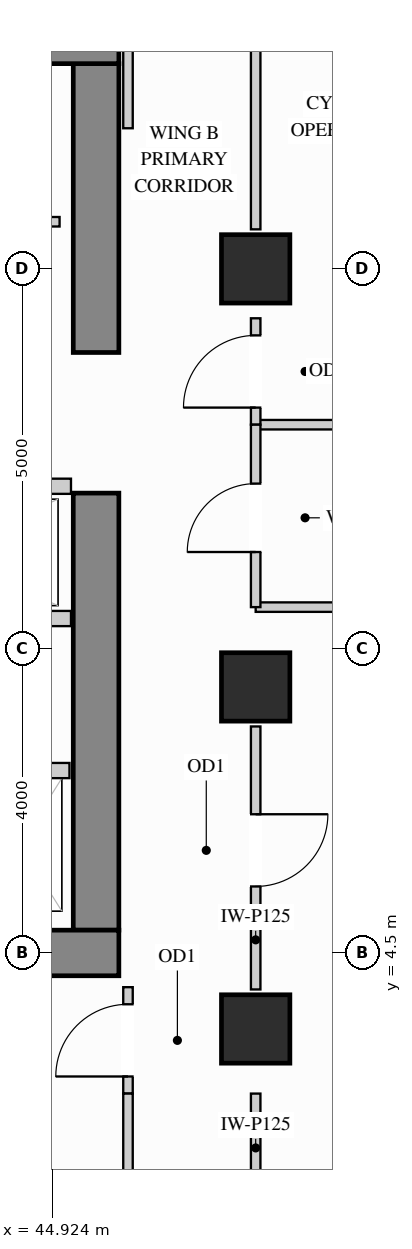
"""IFC4 building model, lengths in metres.
Left out: names, types, materials, properties, quantities, classifications, styles, units other than length and angle.
Written with IfcOpenShell. Run it as: python <this file> out.ifc"""

import sys

from ifc_helpers import new_model, si_unit, direction, frame, frame_2d, origin, origin_2d, place, context, subcontext, project, spatial, rectangle, extrude, source, transform, mapped, element, fill, save


model = new_model("IFC4")
c1 = context("Model", 3, precision=1e-05, world=origin(), true_north=direction((0.0, 1.0)))
c2 = subcontext(c1, "Body", "Model", "MODEL_VIEW")
j1 = project(units=[si_unit("LENGTHUNIT", "METRE"), si_unit("PLANEANGLEUNIT", "RADIAN")], contexts=[c1])
p1 = place(None, origin())
s1 = spatial("IfcSite", under=j1, at=p1, CompositionType="ELEMENT")
p2 = place(p1, origin())
s2 = spatial("IfcBuilding", under=s1, at=p2, CompositionType="ELEMENT")
p3 = place(p2, frame((0.0, 0.0, 193.5)))
s3 = spatial("IfcBuildingStorey", under=s2, at=p3, CompositionType="ELEMENT", Elevation=193.5)
m1 = source(origin(), c2, "Body", "SweptSolid", [
    extrude(rectangle(XDim=0.9, YDim=0.9, at=origin_2d()), origin(), (0.0, 0.0, 1.0), 3.4),
])
for number, where, z_axis, x_axis in (
    (1, (47.6, 13.5, 0.0), (0.0, 0.0, 1.0), (1.0, 0.0, 0.0)),
    (2, (47.6, 3.5, 0.0), (0.0, 0.0, 1.0), (1.0, 0.0, 0.0)),
    (3, (47.6, 8.0, 0.0), (0.0, 0.0, 1.0), (1.0, 0.0, 0.0)),
):
    element("IfcColumn", number, at=place(p3, frame(where, z_axis=z_axis, x_axis=x_axis)), inside=s3, PredefinedType="COLUMN", context=c2, shape_type="MappedRepresentation", body=[
        mapped(m1, transform((0.0, 0.0, 0.0), x_axis=(1.0, 0.0, 0.0), y_axis=(0.0, 1.0, 0.0), z_axis=(0.0, 0.0, 1.0))),
    ])
m2 = source(origin(), c2, "Body", "SweptSolid", [
    extrude(rectangle(XDim=5.75, YDim=0.6, at=frame_2d((2.875, 0.0))), origin(), (0.0, 0.0, 1.0), 3.4),
])
p4 = place(p3, frame((45.5, 4.8, 0.0), z_axis=(0.0, 0.0, 1.0), x_axis=(0.0, 1.0, 0.0)))
e4 = element("IfcWall", 4, at=p4, inside=s3, PredefinedType="SHEAR", context=c2, shape_type="MappedRepresentation", body=[
    mapped(m2, transform((0.0, 0.0, 0.0), x_axis=(1.0, 0.0, 0.0), y_axis=(0.0, 1.0, 0.0), z_axis=(0.0, 0.0, 1.0))),
])
m3 = source(origin(), c2, "Body", "SweptSolid", [
    extrude(rectangle(XDim=3.8, YDim=0.6, at=frame_2d((1.9, 0.0))), origin(), (0.0, 0.0, 1.0), 3.4),
])
p5 = place(p3, frame((45.5, 12.4, 0.0), z_axis=(0.0, 0.0, 1.0), x_axis=(0.0, 1.0, 0.0)))
e5 = element("IfcWall", 5, at=p5, inside=s3, PredefinedType="SHEAR", context=c2, shape_type="MappedRepresentation", body=[
    mapped(m3, transform((0.0, 0.0, 0.0), x_axis=(1.0, 0.0, 0.0), y_axis=(0.0, 1.0, 0.0), z_axis=(0.0, 0.0, 1.0))),
])
m4 = source(origin(), c2, "Body", "SweptSolid", [
    extrude(rectangle(XDim=10.1, YDim=0.6, at=frame_2d((5.05, 0.0))), origin(), (0.0, 0.0, 1.0), 3.4),
])
for number, where, z_axis, x_axis in (
    (6, (35.7, 16.5, 0.0), (0.0, 0.0, 1.0), (1.0, 0.0, 0.0)),
    (7, (35.7, 4.5, 0.0), (0.0, 0.0, 1.0), (1.0, 0.0, 0.0)),
):
    element("IfcWall", number, at=place(p3, frame(where, z_axis=z_axis, x_axis=x_axis)), inside=s3, PredefinedType="SHEAR", context=c2, shape_type="MappedRepresentation", body=[
        mapped(m4, transform((0.0, 0.0, 0.0), x_axis=(1.0, 0.0, 0.0), y_axis=(0.0, 1.0, 0.0), z_axis=(0.0, 0.0, 1.0))),
    ])
p6 = place(p3, frame((40.75, 14.12, 0.0), z_axis=(0.0, 0.0, 1.0), x_axis=(1.0, 0.0, 0.0)))
e8 = element("IfcWall", 8, at=p6, inside=s3, PredefinedType="PARTITIONING", context=c2, shape_type="SweptSolid", body=[
    extrude(rectangle(XDim=4.27, YDim=0.125, at=frame_2d((2.135, 0.0))), origin(), (0.0, 0.0, 1.0), 3.385),
])
p7 = place(p6, frame((1.66, 0.0, 0.0)))
e9 = element("IfcOpeningElement", 9, at=p7, cuts=e8, PredefinedType="OPENING", context=c2, shape_type="SweptSolid", body=[
    extrude(rectangle(XDim=0.95, YDim=2.15, at=frame_2d((0.475, 1.075))), frame((0.0, 0.073, 0.0), z_axis=(0.0, -1.0, 0.0), x_axis=(1.0, 0.0, 0.0)), (0.0, 0.0, 1.0), 0.145),
])
m5 = source(origin(), c2, "Body", "SweptSolid", [
    extrude(rectangle(XDim=5.048, YDim=0.125, at=frame_2d((2.524, 0.0))), origin(), (0.0, 0.0, 1.0), 3.385),
])
for number, where, z_axis, x_axis in (
    (10, (47.6, 11.45, 0.0), (0.0, 0.0, 1.0), (1.0, 0.0, 0.0)),
    (11, (47.6, 9.05, 0.0), (0.0, 0.0, 1.0), (1.0, 0.0, 0.0)),
):
    element("IfcWall", number, at=place(p3, frame(where, z_axis=z_axis, x_axis=x_axis)), inside=s3, PredefinedType="PARTITIONING", context=c2, shape_type="MappedRepresentation", body=[
        mapped(m5, transform((0.0, 0.0, 0.0), x_axis=(1.0, 0.0, 0.0), y_axis=(0.0, 1.0, 0.0), z_axis=(0.0, 0.0, 1.0))),
    ])
p8 = place(p3, frame((47.6, 4.02, 0.0), z_axis=(0.0, 0.0, 1.0), x_axis=(0.0, 1.0, 0.0)))
e12 = element("IfcWall", 12, at=p8, inside=s3, PredefinedType="PARTITIONING", context=c2, shape_type="SweptSolid", body=[
    extrude(rectangle(XDim=3.46, YDim=0.125, at=frame_2d((1.73, 0.0))), origin(), (0.0, 0.0, 1.0), 2.773),
])
p9 = place(p8, frame((1.355, 0.0, 0.0)))
e13 = element("IfcOpeningElement", 13, at=p9, cuts=e12, PredefinedType="OPENING", context=c2, shape_type="SweptSolid", body=[
    extrude(rectangle(XDim=0.95, YDim=2.15, at=frame_2d((0.475, 1.075))), frame((0.0, 0.073, 0.0), z_axis=(0.0, -1.0, 0.0), x_axis=(1.0, 0.0, 0.0)), (0.0, 0.0, 1.0), 0.145),
])
m6 = source(origin(), c2, "Body", "SweptSolid", [
    extrude(rectangle(XDim=1.53, YDim=0.125, at=frame_2d((0.765, 0.0))), origin(), (0.0, 0.0, 1.0), 2.773),
])
p10 = place(p3, frame((47.6, 1.12, 0.0), z_axis=(0.0, 0.0, 1.0), x_axis=(0.0, 1.0, 0.0)))
e14 = element("IfcWall", 14, at=p10, inside=s3, PredefinedType="PARTITIONING", context=c2, shape_type="MappedRepresentation", body=[
    mapped(m6, transform((0.0, 0.0, 0.0), x_axis=(1.0, 0.0, 0.0), y_axis=(0.0, 1.0, 0.0), z_axis=(0.0, 0.0, 1.0))),
])
p11 = place(p3, frame((47.6, 11.45, 0.0), z_axis=(0.0, 0.0, 1.0), x_axis=(0.0, 1.0, 0.0)))
e15 = element("IfcWall", 15, at=p11, inside=s3, PredefinedType="PARTITIONING", context=c2, shape_type="SweptSolid", body=[
    extrude(rectangle(XDim=1.4, YDim=0.125, at=frame_2d((0.7, 0.0))), origin(), (0.0, 0.0, 1.0), 2.773),
])
p12 = place(p11, frame((0.225, 0.0, 0.0)))
e16 = element("IfcOpeningElement", 16, at=p12, cuts=e15, PredefinedType="OPENING", context=c2, shape_type="SweptSolid", body=[
    extrude(rectangle(XDim=0.95, YDim=2.15, at=frame_2d((0.475, 1.075))), frame((0.0, 0.073, 0.0), z_axis=(0.0, -1.0, 0.0), x_axis=(1.0, 0.0, 0.0)), (0.0, 0.0, 1.0), 0.145),
])
m7 = source(origin(), c2, "Body", "SweptSolid", [
    extrude(rectangle(XDim=2.86, YDim=0.125, at=frame_2d((1.43, 0.0))), origin(), (0.0, 0.0, 1.0), 2.773),
])
p13 = place(p3, frame((47.6, 14.02, 0.0), z_axis=(0.0, 0.0, 1.0), x_axis=(0.0, 1.0, 0.0)))
e17 = element("IfcWall", 17, at=p13, inside=s3, PredefinedType="PARTITIONING", context=c2, shape_type="MappedRepresentation", body=[
    mapped(m7, transform((0.0, 0.0, 0.0), x_axis=(1.0, 0.0, 0.0), y_axis=(0.0, 1.0, 0.0), z_axis=(0.0, 0.0, 1.0))),
])
p14 = place(p3, frame((47.6, 9.05, 0.0), z_axis=(0.0, 0.0, 1.0), x_axis=(0.0, 1.0, 0.0)))
e18 = element("IfcWall", 18, at=p14, inside=s3, PredefinedType="PARTITIONING", context=c2, shape_type="SweptSolid", body=[
    extrude(rectangle(XDim=2.4, YDim=0.125, at=frame_2d((1.2, 0.0))), origin(), (0.0, 0.0, 1.0), 2.773),
])
p15 = place(p14, frame((0.725, 0.0, 0.0)))
e19 = element("IfcOpeningElement", 19, at=p15, cuts=e18, PredefinedType="OPENING", context=c2, shape_type="SweptSolid", body=[
    extrude(rectangle(XDim=0.9, YDim=2.15, at=frame_2d((0.45, 1.075))), frame((0.0, 0.073, 0.0), z_axis=(0.0, -1.0, 0.0), x_axis=(1.0, 0.0, 0.0)), (0.0, 0.0, 1.0), 0.145),
])
m8 = source(origin(), c2, "Body", "SweptSolid", [
    extrude(rectangle(XDim=2.298, YDim=0.125, at=frame_2d((1.149, 0.0))), origin(), (0.0, 0.0, 1.0), 3.385),
])
p16 = place(p3, frame((45.92, 15.35, 0.0), z_axis=(0.0, 0.0, 1.0), x_axis=(0.0, 1.0, 0.0)))
e20 = element("IfcWall", 20, at=p16, inside=s3, PredefinedType="PARTITIONING", context=c2, shape_type="MappedRepresentation", body=[
    mapped(m8, transform((0.0, 0.0, 0.0), x_axis=(1.0, 0.0, 0.0), y_axis=(0.0, 1.0, 0.0), z_axis=(0.0, 0.0, 1.0))),
])
p17 = place(p3, frame((45.92, 2.65, 0.0), z_axis=(0.0, 0.0, 1.0), x_axis=(0.0, 1.0, 0.0)))
e21 = element("IfcWall", 21, at=p17, inside=s3, PredefinedType="PARTITIONING", context=c2, shape_type="SweptSolid", body=[
    extrude(rectangle(XDim=1.4, YDim=0.125, at=frame_2d((0.7, 0.0))), origin(), (0.0, 0.0, 1.0), 3.385),
])
p18 = place(p17, frame((0.225, 0.0, 0.0)))
e22 = element("IfcOpeningElement", 22, at=p18, cuts=e21, PredefinedType="OPENING", context=c2, shape_type="SweptSolid", body=[
    extrude(rectangle(XDim=0.95, YDim=2.15, at=frame_2d((0.475, 1.075))), frame((0.0, 0.073, 0.0), z_axis=(0.0, -1.0, 0.0), x_axis=(1.0, 0.0, 0.0)), (0.0, 0.0, 1.0), 0.145),
])
p19 = place(p3, frame((45.92, 0.352, 0.0), z_axis=(0.0, 0.0, 1.0), x_axis=(0.0, 1.0, 0.0)))
e23 = element("IfcWall", 23, at=p19, inside=s3, PredefinedType="PARTITIONING", context=c2, shape_type="MappedRepresentation", body=[
    mapped(m8, transform((0.0, 0.0, 0.0), x_axis=(1.0, 0.0, 0.0), y_axis=(0.0, 1.0, 0.0), z_axis=(0.0, 0.0, 1.0))),
])
m9 = source(origin(), c2, "Body", "SweptSolid", [
    extrude(rectangle(XDim=1.3, YDim=0.2, at=frame_2d((0.65, 0.0))), origin(), (0.0, 0.0, 1.0), 3.385),
])
p20 = place(p3, frame((43.85, 6.9, 0.0), z_axis=(0.0, 0.0, 1.0), x_axis=(1.0, 0.0, 0.0)))
e24 = element("IfcWall", 24, at=p20, inside=s3, PredefinedType="PARTITIONING", context=c2, shape_type="MappedRepresentation", body=[
    mapped(m9, transform((0.0, 0.0, 0.0), x_axis=(1.0, 0.0, 0.0), y_axis=(0.0, 1.0, 0.0), z_axis=(0.0, 0.0, 1.0))),
])
m10 = source(origin(), c2, "Body", "SweptSolid", [
    extrude(rectangle(XDim=3.49, YDim=0.2, at=frame_2d((1.745, 0.0))), origin(), (0.0, 0.0, 1.0), 3.385),
])
for number, where, z_axis, x_axis in (
    (25, (41.68, 10.64, 0.0), (0.0, 0.0, 1.0), (1.0, 0.0, 0.0)),
    (26, (41.68, 8.9, 0.0), (0.0, 0.0, 1.0), (1.0, 0.0, 0.0)),
):
    element("IfcWall", number, at=place(p3, frame(where, z_axis=z_axis, x_axis=x_axis)), inside=s3, PredefinedType="PARTITIONING", context=c2, shape_type="MappedRepresentation", body=[
        mapped(m10, transform((0.0, 0.0, 0.0), x_axis=(1.0, 0.0, 0.0), y_axis=(0.0, 1.0, 0.0), z_axis=(0.0, 0.0, 1.0))),
    ])
m11 = source(origin(), c2, "Body", "SweptSolid", [
    extrude(rectangle(XDim=0.95, YDim=2.15, at=frame_2d((0.475, 1.075))), frame((0.0, 0.025, 0.0), z_axis=(0.0, -1.0, 0.0), x_axis=(1.0, 0.0, 0.0)), (0.0, 0.0, 1.0), 0.05),
])
p21 = place(p18, origin())
e27 = element("IfcDoor", 27, at=p21, inside=s3, OperationType="SINGLE_SWING_LEFT", PredefinedType="DOOR", context=c2, shape_type="MappedRepresentation", body=[
    mapped(m11, transform((0.0, 0.0, 0.0), x_axis=(1.0, 0.0, 0.0), y_axis=(0.0, 1.0, 0.0), z_axis=(0.0, 0.0, 1.0))),
])
fill(e22, e27)
p22 = place(p9, origin())
e28 = element("IfcDoor", 28, at=p22, inside=s3, OperationType="SINGLE_SWING_RIGHT", PredefinedType="DOOR", context=c2, shape_type="MappedRepresentation", body=[
    mapped(m11, transform((0.0, 0.0, 0.0), x_axis=(1.0, 0.0, 0.0), y_axis=(0.0, 1.0, 0.0), z_axis=(0.0, 0.0, 1.0))),
])
fill(e13, e28)
p23 = place(p12, origin())
e29 = element("IfcDoor", 29, at=p23, inside=s3, OperationType="SINGLE_SWING_LEFT", PredefinedType="DOOR", context=c2, shape_type="MappedRepresentation", body=[
    mapped(m11, transform((0.0, 0.0, 0.0), x_axis=(1.0, 0.0, 0.0), y_axis=(0.0, 1.0, 0.0), z_axis=(0.0, 0.0, 1.0))),
])
fill(e16, e29)
m12 = source(origin(), c2, "Body", "SweptSolid", [
    extrude(rectangle(XDim=0.9, YDim=2.15, at=frame_2d((0.45, 1.075))), frame((0.0, 0.025, 0.0), z_axis=(0.0, -1.0, 0.0), x_axis=(1.0, 0.0, 0.0)), (0.0, 0.0, 1.0), 0.05),
])
p24 = place(p15, origin())
e30 = element("IfcDoor", 30, at=p24, inside=s3, OperationType="SINGLE_SWING_LEFT", PredefinedType="DOOR", context=c2, shape_type="MappedRepresentation", body=[
    mapped(m12, transform((0.0, 0.0, 0.0), x_axis=(1.0, 0.0, 0.0), y_axis=(0.0, 1.0, 0.0), z_axis=(0.0, 0.0, 1.0))),
])
fill(e19, e30)
save(model, sys.argv[1])
